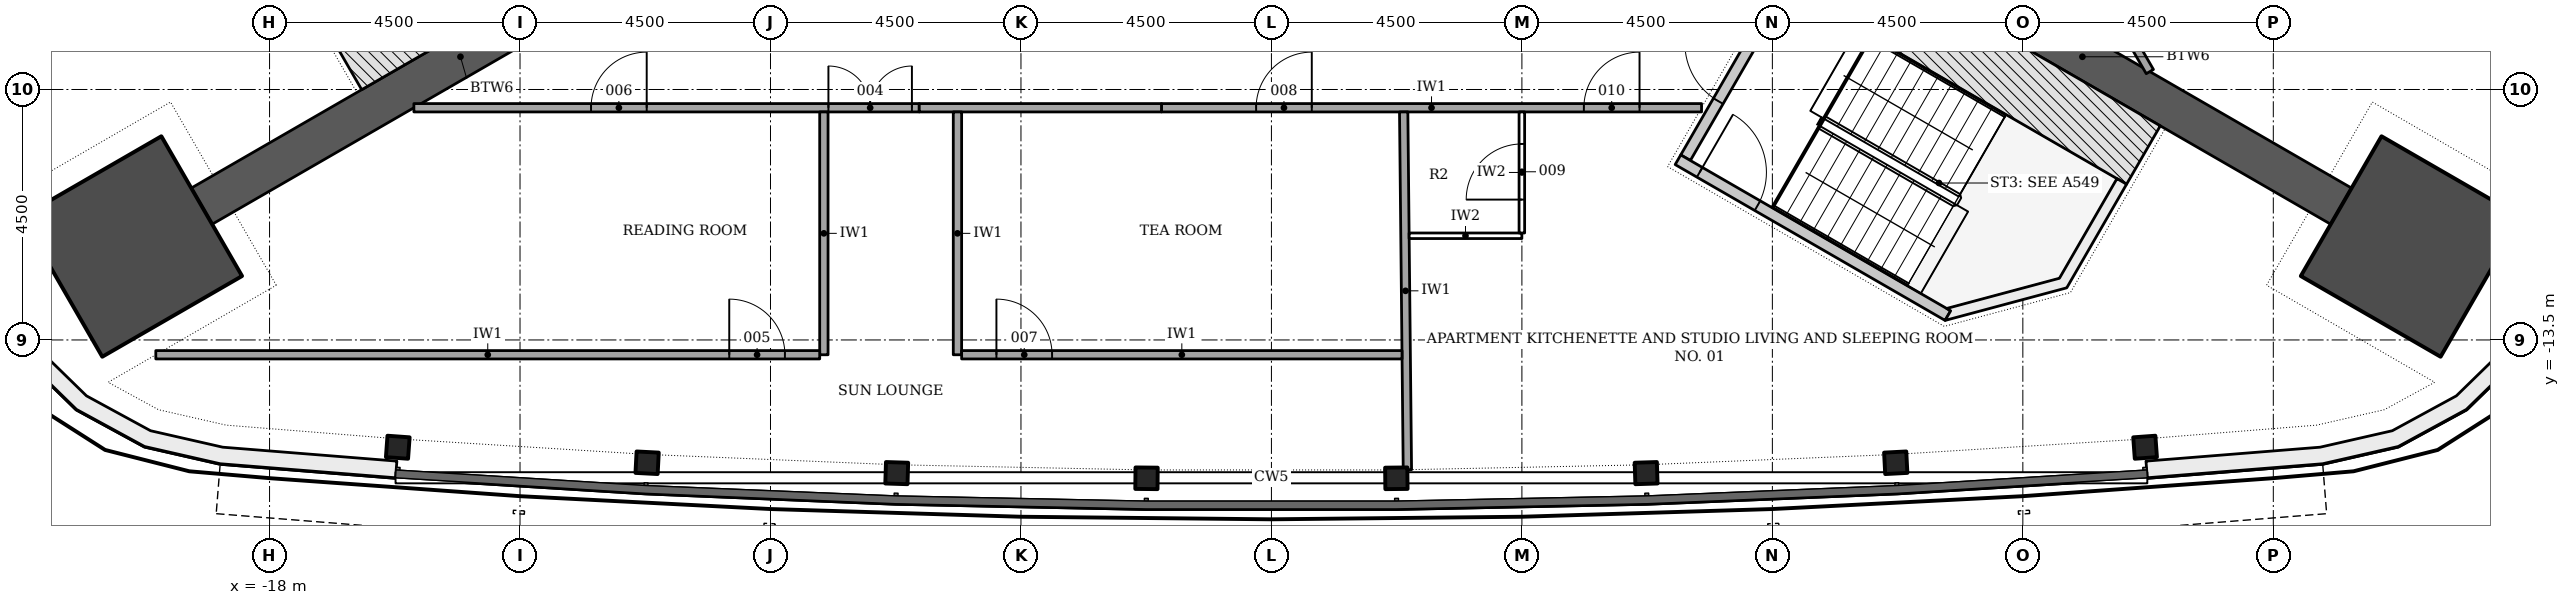
"""IFC4 building model, lengths in metres.
Left out: names, types, materials, properties, quantities, classifications, styles, units other than length and angle.
Written with IfcOpenShell. Run it as: python <this file> out.ifc"""

import sys

from ifc_helpers import new_model, si_unit, direction, frame, frame_2d, origin, origin_2d, place, context, subcontext, project, spatial, polyline, rectangle, i_section, outline, extrude, element, fill, save


model = new_model("IFC4")
c1 = context("Model", 3, precision=1e-05, world=origin(), true_north=direction((0.0, 1.0)))
c2 = subcontext(c1, "Body", "Model", "MODEL_VIEW")
j1 = project(units=[si_unit("LENGTHUNIT", "METRE"), si_unit("PLANEANGLEUNIT", "RADIAN")], contexts=[c1])
p1 = place(None, origin())
s1 = spatial("IfcSite", under=j1, at=p1, CompositionType="ELEMENT")
p2 = place(p1, origin())
s2 = spatial("IfcBuilding", under=s1, at=p2, CompositionType="ELEMENT")
p3 = place(p2, frame((0.0, 0.0, 150.9)))
s3 = spatial("IfcBuildingStorey", under=s2, at=p3, CompositionType="ELEMENT", Elevation=150.9)
for number, where, z_axis, x_axis in (
    (1, (-9.922, -5.728, -0.2), (0.0, 0.0, 1.0), (-0.866, -0.5, 0.0)),
    (2, (9.922, -5.728, -0.2), (0.0, 0.0, 1.0), (0.866, -0.5, 0.0)),
):
    element("IfcWall", number, at=place(p3, frame(where, z_axis=z_axis, x_axis=x_axis)), inside=s3, PredefinedType="SHEAR", context=c2, shape_type="SweptSolid", body=[
        extrude(rectangle(XDim=10.735, YDim=0.75, at=frame_2d((5.368, 0.0))), origin(), (0.0, 0.0, 1.0), 3.6),
    ])
for number, where, z_axis, x_axis in (
    (3, (-20.475, -11.821, -0.2), (0.0, 0.0, 1.0), (-0.866, -0.5, 0.0)),
    (4, (20.475, -11.821, -0.2), (0.0, 0.0, 1.0), (0.866, -0.5, 0.0)),
):
    element("IfcColumn", number, at=place(p3, frame(where, z_axis=z_axis, x_axis=x_axis)), inside=s3, PredefinedType="COLUMN", context=c2, shape_type="SweptSolid", body=[
        extrude(rectangle(XDim=2.9, YDim=2.9, at=origin_2d()), origin(), (0.0, 0.0, 1.0), 3.6),
    ])
for number, where, z_axis, x_axis in (
    (5, (-15.696, -15.427, -0.2), (0.0, 0.0, 1.0), (0.997, -0.072, 0.0)),
    (6, (-11.217, -15.707, -0.2), (0.0, 0.0, 1.0), (0.999, -0.052, 0.0)),
    (7, (-6.732, -15.893, -0.2), (0.0, 0.0, 1.0), (1.0, -0.031, 0.0)),
    (8, (-2.244, -15.986, -0.2), (0.0, 0.0, 1.0), (1.0, -0.01, 0.0)),
    (9, (2.244, -15.986, -0.2), (0.0, 0.0, 1.0), (1.0, 0.01, 0.0)),
    (10, (6.732, -15.893, -0.2), (0.0, 0.0, 1.0), (1.0, 0.031, 0.0)),
    (11, (11.217, -15.707, -0.2), (0.0, 0.0, 1.0), (0.999, 0.052, 0.0)),
    (12, (15.696, -15.427, -0.2), (0.0, 0.0, 1.0), (0.997, 0.072, 0.0)),
):
    element("IfcColumn", number, at=place(p3, frame(where, z_axis=z_axis, x_axis=x_axis)), inside=s3, PredefinedType="COLUMN", context=c2, shape_type="SweptSolid", body=[
        extrude(i_section(OverallWidth=0.399, OverallDepth=0.386, WebThickness=0.021, FlangeThickness=0.033, FilletRadius=0.015, at=origin_2d()), origin(), (0.0, 0.0, 1.0), 3.6),
    ])
p4 = place(p3, origin())
e13 = element("IfcWall", 13, at=p4, inside=s3, PredefinedType="NOTDEFINED", context=c2, shape_type="SweptSolid", body=[
    extrude(outline(polyline([(-21.704, -5.64), (-23.061, -8.494), (-23.472, -9.826), (-23.507, -11.219), (-23.163, -12.569), (-22.466, -13.775), (-21.469, -14.748), (-20.245, -15.414), (-18.887, -15.724), (-15.736, -15.976), (-15.712, -15.677), (-18.841, -15.427), (-20.138, -15.131), (-21.289, -14.504), (-22.227, -13.589), (-22.882, -12.455), (-23.206, -11.185), (-23.173, -9.875), (-22.781, -8.604), (-21.433, -5.769), (-21.704, -5.64)])), origin(), (0.0, 0.0, 1.0), 3.3),
])
p5 = place(p3, origin())
e14 = element("IfcWall", 14, at=p5, inside=s3, PredefinedType="NOTDEFINED", context=c2, shape_type="SweptSolid", body=[
    extrude(outline(polyline([(15.736, -15.976), (18.887, -15.724), (20.245, -15.414), (21.469, -14.748), (22.466, -13.775), (23.163, -12.569), (23.507, -11.219), (23.472, -9.826), (23.061, -8.494), (21.704, -5.64), (21.433, -5.769), (22.781, -8.604), (23.173, -9.875), (23.206, -11.185), (22.882, -12.455), (22.227, -13.589), (21.289, -14.504), (20.138, -15.131), (18.841, -15.427), (15.712, -15.677), (15.736, -15.976)])), origin(), (0.0, 0.0, 1.0), 3.3),
])
p6 = place(p3, frame((-10.412, -4.879, -0.2), z_axis=(0.0, 0.0, 1.0), x_axis=(-0.866026919366, -0.499997374926, 0.0)))
e15 = element("IfcWall", 15, at=p6, inside=s3, PredefinedType="SHEAR", context=c2, shape_type="SweptSolid", body=[
    extrude(rectangle(XDim=7.2, YDim=1.211, at=frame_2d((3.6, 0.0))), origin(), (0.0, 0.0, 1.0), 3.6),
])
p7 = place(p3, frame((7.44, -10.226, -0.2), z_axis=(0.0, 0.0, 1.0), x_axis=(0.500022077904, 0.866012656725, 0.0)))
e16 = element("IfcWall", 16, at=p7, inside=s3, PredefinedType="SHEAR", context=c2, shape_type="SweptSolid", body=[
    extrude(rectangle(XDim=3.55, YDim=0.2, at=frame_2d((1.775, 0.0))), origin(), (0.0, 0.0, 1.0), 3.6),
])
p8 = place(p7, frame((1.175, 0.0, 0.2)))
e17 = element("IfcOpeningElement", 17, at=p8, cuts=e16, PredefinedType="OPENING", context=c2, shape_type="SweptSolid", body=[
    extrude(rectangle(XDim=1.2, YDim=2.1, at=frame_2d((0.6, 1.05))), frame((0.0, 0.11, 0.0), z_axis=(0.0, -1.0, 0.0), x_axis=(1.0, 0.0, 0.0)), (0.0, 0.0, 1.0), 0.22),
])
p9 = place(p3, frame((7.304, -10.262, -0.2), z_axis=(0.0, 0.0, 1.0), x_axis=(0.866026594901, -0.49999793692, 0.0)))
e18 = element("IfcWall", 18, at=p9, inside=s3, PredefinedType="SHEAR", context=c2, shape_type="SweptSolid", body=[
    extrude(rectangle(XDim=5.6, YDim=0.2, at=frame_2d((2.8, 0.0))), origin(), (0.0, 0.0, 1.0), 3.6),
])
p10 = place(p9, frame((0.45, 0.0, 0.2)))
e19 = element("IfcOpeningElement", 19, at=p10, cuts=e18, PredefinedType="OPENING", context=c2, shape_type="SweptSolid", body=[
    extrude(rectangle(XDim=1.2, YDim=2.1, at=frame_2d((0.6, 1.05))), frame((0.0, 0.11, 0.0), z_axis=(0.0, -1.0, 0.0), x_axis=(1.0, 0.0, 0.0)), (0.0, 0.0, 1.0), 0.22),
])
p11 = place(p3, frame((9.431, -6.577, -0.2), z_axis=(0.0, 0.0, 1.0), x_axis=(0.866018442252, -0.500012057535, 0.0)))
e20 = element("IfcWall", 20, at=p11, inside=s3, PredefinedType="SHEAR", context=c2, shape_type="SweptSolid", body=[
    extrude(rectangle(XDim=7.2, YDim=1.211, at=frame_2d((3.6, 0.0))), origin(), (0.0, 0.0, 1.0), 3.6),
])
p12 = place(p3, frame((0.0, 0.0, -0.2)))
e21 = element("IfcWall", 21, at=p12, inside=s3, PredefinedType="SHEAR", context=c2, shape_type="SweptSolid", body=[
    extrude(outline(polyline([(12.104, -13.149), (14.289, -12.563), (15.364, -10.701), (15.191, -10.601), (14.157, -12.392), (12.132, -12.934), (12.204, -12.976), (12.204, -12.976), (12.204, -12.976), (12.204, -12.976), (12.204, -12.976), (12.204, -12.976), (12.204, -12.976), (12.204, -12.976), (12.204, -12.976), (12.204, -12.976), (12.204, -12.976), (12.204, -12.976), (12.204, -12.976), (12.204, -12.976), (12.204, -12.976), (12.204, -12.976), (12.204, -12.976), (12.104, -13.149)])), origin(), (0.0, 0.0, 1.0), 3.6),
])
p13 = place(p3, frame((15.782, -8.679, 0.0), z_axis=(0.0, 0.0, 1.0), x_axis=(-0.500005644317, 0.866022145012, 0.0)))
e22 = element("IfcWall", 22, at=p13, inside=s3, PredefinedType="PARTITIONING", context=c2, shape_type="SweptSolid", body=[
    extrude(rectangle(XDim=9.08, YDim=0.15, at=frame_2d((4.54, 0.0))), origin(), (0.0, 0.0, 1.0), 2.847),
])
p14 = place(p3, frame((-15.407, -9.328, 0.0), z_axis=(0.0, 0.0, 1.0), x_axis=(1.0, 0.0, 0.0)))
e23 = element("IfcWall", 23, at=p14, inside=s3, PredefinedType="PARTITIONING", context=c2, shape_type="SweptSolid", body=[
    extrude(rectangle(XDim=9.079, YDim=0.15, at=frame_2d((4.54, 0.0))), origin(), (0.0, 0.0, 1.0), 2.847),
])
p15 = place(p14, frame((7.448, 0.0, 0.0)))
e24 = element("IfcOpeningElement", 24, at=p15, cuts=e23, PredefinedType="OPENING", context=c2, shape_type="SweptSolid", body=[
    extrude(rectangle(XDim=1.5, YDim=2.1, at=frame_2d((0.75, 1.05))), frame((0.0, 0.085, 0.0), z_axis=(0.0, -1.0, 0.0), x_axis=(1.0, 0.0, 0.0)), (0.0, 0.0, 1.0), 0.17),
])
p16 = place(p14, frame((3.183, 0.0, 0.0)))
e25 = element("IfcOpeningElement", 25, at=p16, cuts=e23, PredefinedType="OPENING", context=c2, shape_type="SweptSolid", body=[
    extrude(rectangle(XDim=1.0, YDim=2.1, at=frame_2d((0.5, 1.05))), frame((0.0, 0.085, 0.0), z_axis=(0.0, -1.0, 0.0), x_axis=(1.0, 0.0, 0.0)), (0.0, 0.0, 1.0), 0.17),
])
p17 = place(p3, frame((-1.975, -9.328, 0.0), z_axis=(0.0, 0.0, 1.0), x_axis=(1.0, 0.0, 0.0)))
e26 = element("IfcWall", 26, at=p17, inside=s3, PredefinedType="PARTITIONING", context=c2, shape_type="SweptSolid", body=[
    extrude(rectangle(XDim=9.703, YDim=0.15, at=frame_2d((4.852, 0.0))), origin(), (0.0, 0.0, 1.0), 2.847),
])
p18 = place(p17, frame((1.7, 0.0, 0.0)))
e27 = element("IfcOpeningElement", 27, at=p18, cuts=e26, PredefinedType="OPENING", context=c2, shape_type="SweptSolid", body=[
    extrude(rectangle(XDim=1.0, YDim=2.1, at=frame_2d((0.5, 1.05))), frame((0.0, 0.085, 0.0), z_axis=(0.0, -1.0, 0.0), x_axis=(1.0, 0.0, 0.0)), (0.0, 0.0, 1.0), 0.17),
])
p19 = place(p17, frame((7.589, 0.0, 0.0)))
e28 = element("IfcOpeningElement", 28, at=p19, cuts=e26, PredefinedType="OPENING", context=c2, shape_type="SweptSolid", body=[
    extrude(rectangle(XDim=1.0, YDim=2.1, at=frame_2d((0.5, 1.05))), frame((0.0, 0.085, 0.0), z_axis=(0.0, -1.0, 0.0), x_axis=(1.0, 0.0, 0.0)), (0.0, 0.0, 1.0), 0.17),
])
p20 = place(p3, frame((-6.328, -9.328, 0.0), z_axis=(0.0, 0.0, 1.0), x_axis=(1.0, 0.0, 0.0)))
e29 = element("IfcWall", 29, at=p20, inside=s3, PredefinedType="PARTITIONING", context=c2, shape_type="SweptSolid", body=[
    extrude(rectangle(XDim=4.352, YDim=0.15, at=frame_2d((2.176, 0.0))), origin(), (0.0, 0.0, 1.0), 2.847),
])
p21 = place(p3, frame((2.443, -15.831, 0.0), z_axis=(0.0, 0.0, 1.0), x_axis=(-0.010368237525, 0.999946248381, 0.0)))
e30 = element("IfcWall", 30, at=p21, inside=s3, PredefinedType="PARTITIONING", context=c2, shape_type="SweptSolid", body=[
    extrude(rectangle(XDim=6.428, YDim=0.15, at=frame_2d((3.214, 0.0))), origin(), (0.0, 0.0, 1.0), 3.4),
])
for number, where, z_axis, x_axis in (
    (31, (-8.041, -9.403, 0.0), (0.0, 0.0, 1.0), (0.0, -1.0, 0.0)),
    (32, (-5.641, -9.403, 0.0), (0.0, 0.0, 1.0), (0.0, -1.0, 0.0)),
):
    element("IfcWall", number, at=place(p3, frame(where, z_axis=z_axis, x_axis=x_axis)), inside=s3, PredefinedType="PARTITIONING", context=c2, shape_type="SweptSolid", body=[
        extrude(rectangle(XDim=4.363, YDim=0.15, at=frame_2d((2.181, 0.0))), origin(), (0.0, 0.0, 1.0), 3.4),
    ])
p22 = place(p3, frame((-20.043, -13.766, 0.0), z_axis=(0.0, 0.0, 1.0), x_axis=(1.0, 0.0, 0.0)))
e33 = element("IfcWall", 33, at=p22, inside=s3, PredefinedType="PARTITIONING", context=c2, shape_type="SweptSolid", body=[
    extrude(rectangle(XDim=11.927, YDim=0.15, at=frame_2d((5.964, 0.0))), origin(), (0.0, 0.0, 1.0), 2.847),
])
p23 = place(p22, frame((10.303, 0.0, 0.0)))
e34 = element("IfcOpeningElement", 34, at=p23, cuts=e33, PredefinedType="OPENING", context=c2, shape_type="SweptSolid", body=[
    extrude(rectangle(XDim=1.0, YDim=2.1, at=frame_2d((0.5, 1.05))), frame((0.0, 0.085, 0.0), z_axis=(0.0, -1.0, 0.0), x_axis=(1.0, 0.0, 0.0)), (0.0, 0.0, 1.0), 0.17),
])
p24 = place(p3, frame((-5.566, -13.766, 0.0), z_axis=(0.0, 0.0, 1.0), x_axis=(1.0, 0.0, 0.0)))
e35 = element("IfcWall", 35, at=p24, inside=s3, PredefinedType="PARTITIONING", context=c2, shape_type="SweptSolid", body=[
    extrude(rectangle(XDim=7.912, YDim=0.15, at=frame_2d((3.956, 0.0))), origin(), (0.0, 0.0, 1.0), 2.847),
])
p25 = place(p24, frame((0.625, 0.0, 0.0)))
e36 = element("IfcOpeningElement", 36, at=p25, cuts=e35, PredefinedType="OPENING", context=c2, shape_type="SweptSolid", body=[
    extrude(rectangle(XDim=1.0, YDim=2.1, at=frame_2d((0.5, 1.05))), frame((0.0, 0.085, 0.0), z_axis=(0.0, -1.0, 0.0), x_axis=(1.0, 0.0, 0.0)), (0.0, 0.0, 1.0), 0.17),
])
p26 = place(p3, frame((2.474, -11.628, 0.0), z_axis=(0.0, 0.0, 1.0), x_axis=(1.0, 0.0, 0.0)))
e37 = element("IfcWall", 37, at=p26, inside=s3, PredefinedType="PARTITIONING", context=c2, shape_type="SweptSolid", body=[
    extrude(rectangle(XDim=2.025, YDim=0.1, at=frame_2d((1.012, 0.0))), origin(), (0.0, 0.0, 1.0), 3.4),
])
p27 = place(p3, frame((4.499, -11.578, 0.0), z_axis=(0.0, 0.0, 1.0), x_axis=(0.0, 1.0, 0.0)))
e38 = element("IfcWall", 38, at=p27, inside=s3, PredefinedType="PARTITIONING", context=c2, shape_type="SweptSolid", body=[
    extrude(rectangle(XDim=2.175, YDim=0.1, at=frame_2d((1.087, 0.0))), origin(), (0.0, 0.0, 1.0), 3.4),
])
p28 = place(p27, frame((0.6, 0.0, 0.0)))
e39 = element("IfcOpeningElement", 39, at=p28, cuts=e38, PredefinedType="OPENING", context=c2, shape_type="SweptSolid", body=[
    extrude(rectangle(XDim=1.0, YDim=2.1, at=frame_2d((0.5, 1.05))), frame((0.0, 0.06, 0.0), z_axis=(0.0, -1.0, 0.0), x_axis=(1.0, 0.0, 0.0)), (0.0, 0.0, 1.0), 0.12),
])
p29 = place(p8, origin())
e40 = element("IfcDoor", 40, at=p29, inside=s3, OperationType="SINGLE_SWING_RIGHT", PredefinedType="DOOR", context=c2, shape_type="SweptSolid", body=[
    extrude(rectangle(XDim=1.2, YDim=2.1, at=frame_2d((0.6, 1.05))), frame((0.0, 0.025, 0.0), z_axis=(0.0, -1.0, 0.0), x_axis=(1.0, 0.0, 0.0)), (0.0, 0.0, 1.0), 0.05),
])
fill(e17, e40)
p30 = place(p10, origin())
e41 = element("IfcDoor", 41, at=p30, inside=s3, OperationType="SINGLE_SWING_LEFT", PredefinedType="DOOR", context=c2, shape_type="SweptSolid", body=[
    extrude(rectangle(XDim=1.2, YDim=2.1, at=frame_2d((0.6, 1.05))), frame((0.0, 0.025, 0.0), z_axis=(0.0, -1.0, 0.0), x_axis=(1.0, 0.0, 0.0)), (0.0, 0.0, 1.0), 0.05),
])
fill(e19, e41)
p31 = place(p15, origin())
e42 = element("IfcDoor", 42, at=p31, inside=s3, OperationType="DOUBLE_DOOR_SINGLE_SWING", PredefinedType="DOOR", context=c2, shape_type="SweptSolid", body=[
    extrude(rectangle(XDim=1.5, YDim=2.1, at=frame_2d((0.75, 1.05))), frame((0.0, 0.025, 0.0), z_axis=(0.0, -1.0, 0.0), x_axis=(1.0, 0.0, 0.0)), (0.0, 0.0, 1.0), 0.05),
])
fill(e24, e42)
p32 = place(p23, origin())
e43 = element("IfcDoor", 43, at=p32, inside=s3, OperationType="SINGLE_SWING_LEFT", PredefinedType="DOOR", context=c2, shape_type="SweptSolid", body=[
    extrude(rectangle(XDim=1.0, YDim=2.1, at=frame_2d((0.5, 1.05))), frame((0.0, 0.025, 0.0), z_axis=(0.0, -1.0, 0.0), x_axis=(1.0, 0.0, 0.0)), (0.0, 0.0, 1.0), 0.05),
])
fill(e34, e43)
p33 = place(p16, origin())
e44 = element("IfcDoor", 44, at=p33, inside=s3, OperationType="SINGLE_SWING_RIGHT", PredefinedType="DOOR", context=c2, shape_type="SweptSolid", body=[
    extrude(rectangle(XDim=1.0, YDim=2.1, at=frame_2d((0.5, 1.05))), frame((0.0, 0.025, 0.0), z_axis=(0.0, -1.0, 0.0), x_axis=(1.0, 0.0, 0.0)), (0.0, 0.0, 1.0), 0.05),
])
fill(e25, e44)
p34 = place(p25, origin())
e45 = element("IfcDoor", 45, at=p34, inside=s3, OperationType="SINGLE_SWING_LEFT", PredefinedType="DOOR", context=c2, shape_type="SweptSolid", body=[
    extrude(rectangle(XDim=1.0, YDim=2.1, at=frame_2d((0.5, 1.05))), frame((0.0, 0.025, 0.0), z_axis=(0.0, -1.0, 0.0), x_axis=(1.0, 0.0, 0.0)), (0.0, 0.0, 1.0), 0.05),
])
fill(e36, e45)
p35 = place(p18, origin())
e46 = element("IfcDoor", 46, at=p35, inside=s3, OperationType="SINGLE_SWING_RIGHT", PredefinedType="DOOR", context=c2, shape_type="SweptSolid", body=[
    extrude(rectangle(XDim=1.0, YDim=2.1, at=frame_2d((0.5, 1.05))), frame((0.0, 0.025, 0.0), z_axis=(0.0, -1.0, 0.0), x_axis=(1.0, 0.0, 0.0)), (0.0, 0.0, 1.0), 0.05),
])
fill(e27, e46)
p36 = place(p28, origin())
e47 = element("IfcDoor", 47, at=p36, inside=s3, OperationType="SINGLE_SWING_LEFT", PredefinedType="DOOR", context=c2, shape_type="SweptSolid", body=[
    extrude(rectangle(XDim=1.0, YDim=2.1, at=frame_2d((0.5, 1.05))), frame((0.0, 0.025, 0.0), z_axis=(0.0, -1.0, 0.0), x_axis=(1.0, 0.0, 0.0)), (0.0, 0.0, 1.0), 0.05),
])
fill(e39, e47)
p37 = place(p19, origin())
e48 = element("IfcDoor", 48, at=p37, inside=s3, OperationType="SINGLE_SWING_RIGHT", PredefinedType="DOOR", context=c2, shape_type="SweptSolid", body=[
    extrude(rectangle(XDim=1.0, YDim=2.1, at=frame_2d((0.5, 1.05))), frame((0.0, 0.025, 0.0), z_axis=(0.0, -1.0, 0.0), x_axis=(1.0, 0.0, 0.0)), (0.0, 0.0, 1.0), 0.05),
])
fill(e28, e48)
save(model, sys.argv[1])
